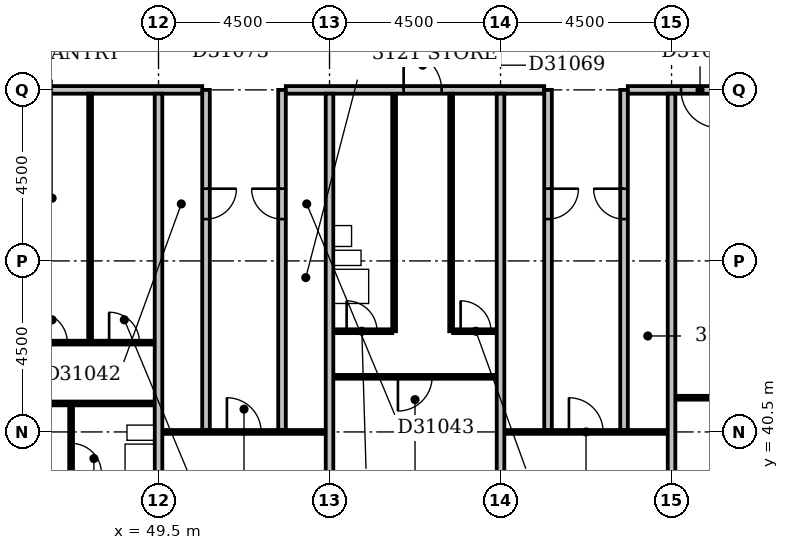
"""IFC4 building model, lengths in metres.
Left out: names, types, materials, properties, quantities, classifications, styles, units other than length and angle.
Written with IfcOpenShell. Run it as: python <this file> out.ifc"""

import sys

from ifc_helpers import new_model, si_unit, direction, frame, frame_2d, origin, place, context, subcontext, project, spatial, rectangle, extrude, element, fill, save


model = new_model("IFC4")
c1 = context("Model", 3, precision=1e-05, world=origin(), true_north=direction((0.0, 1.0)))
c2 = subcontext(c1, "Body", "Model", "MODEL_VIEW")
j1 = project(units=[si_unit("LENGTHUNIT", "METRE"), si_unit("PLANEANGLEUNIT", "RADIAN")], contexts=[c1])
p1 = place(None, origin())
s1 = spatial("IfcSite", under=j1, at=p1, CompositionType="ELEMENT")
p2 = place(p1, origin())
s2 = spatial("IfcBuilding", under=s1, at=p2, CompositionType="ELEMENT")
p3 = place(p2, frame((0.0, 0.0, 126.8)))
s3 = spatial("IfcBuildingStorey", under=s2, at=p3, CompositionType="ELEMENT", Elevation=126.8)
p4 = place(p3, frame((49.5, 36.5, 0.0), z_axis=(0.0, 0.0, 1.0), x_axis=(0.0, 1.0, 0.0)))
e1 = element("IfcWall", 1, at=p4, inside=s3, PredefinedType="PARTITIONING", context=c2, shape_type="SweptSolid", body=[
    extrude(rectangle(XDim=12.9, YDim=0.2, at=frame_2d((6.45, 0.0))), origin(), (0.0, 0.0, 1.0), 3.3),
])
p5 = place(p3, frame((54.0, 36.5, 0.0), z_axis=(0.0, 0.0, 1.0), x_axis=(0.0, 1.0, 0.0)))
e2 = element("IfcWall", 2, at=p5, inside=s3, PredefinedType="PARTITIONING", context=c2, shape_type="SweptSolid", body=[
    extrude(rectangle(XDim=12.9, YDim=0.2, at=frame_2d((6.45, 0.0))), origin(), (0.0, 0.0, 1.0), 2.6),
])
p6 = place(p3, frame((58.5, 36.5, 0.0), z_axis=(0.0, 0.0, 1.0), x_axis=(0.0, 1.0, 0.0)))
e3 = element("IfcWall", 3, at=p6, inside=s3, PredefinedType="PARTITIONING", context=c2, shape_type="SweptSolid", body=[
    extrude(rectangle(XDim=12.9, YDim=0.2, at=frame_2d((6.45, 0.0))), origin(), (0.0, 0.0, 1.0), 3.3),
])
p7 = place(p3, frame((63.0, 36.5, 0.0), z_axis=(0.0, 0.0, 1.0), x_axis=(0.0, 1.0, 0.0)))
e4 = element("IfcWall", 4, at=p7, inside=s3, PredefinedType="PARTITIONING", context=c2, shape_type="SweptSolid", body=[
    extrude(rectangle(XDim=12.9, YDim=0.2, at=frame_2d((6.45, 0.0))), origin(), (0.0, 0.0, 1.0), 2.4),
])
p8 = place(p3, frame((47.2, 38.35, 0.0), z_axis=(0.0, 0.0, 1.0), x_axis=(0.0, 1.0, 0.0)))
e5 = element("IfcWall", 5, at=p8, inside=s3, PredefinedType="PLUMBINGWALL", context=c2, shape_type="SweptSolid", body=[
    extrude(rectangle(XDim=2.85, YDim=0.1, at=frame_2d((1.425, 0.0))), origin(), (0.0, 0.0, 1.0), 3.3),
])
p9 = place(p8, frame((1.05, 0.0, 0.0)))
e6 = element("IfcOpeningElement", 6, at=p9, cuts=e5, PredefinedType="OPENING", context=c2, shape_type="SweptSolid", body=[
    extrude(rectangle(XDim=0.8, YDim=2.1, at=frame_2d((0.4, 1.05))), frame((0.0, 0.062, 0.0), z_axis=(0.0, -1.0, 0.0), x_axis=(1.0, 0.0, 0.0)), (0.0, 0.0, 1.0), 0.124),
])
p10 = place(p3, frame((49.6, 40.5, 0.0), z_axis=(0.0, 0.0, 1.0), x_axis=(1.0, 0.0, 0.0)))
e7 = element("IfcWall", 7, at=p10, inside=s3, PredefinedType="PARTITIONING", context=c2, shape_type="SweptSolid", body=[
    extrude(rectangle(XDim=4.3, YDim=0.1, at=frame_2d((2.15, 0.0))), origin(), (0.0, 0.0, 1.0), 3.3),
])
p11 = place(p10, frame((1.7, 0.0, 0.0)))
e8 = element("IfcOpeningElement", 8, at=p11, cuts=e7, PredefinedType="OPENING", context=c2, shape_type="SweptSolid", body=[
    extrude(rectangle(XDim=0.9, YDim=2.1, at=frame_2d((0.45, 1.05))), frame((0.0, 0.062, 0.0), z_axis=(0.0, -1.0, 0.0), x_axis=(1.0, 0.0, 0.0)), (0.0, 0.0, 1.0), 0.124),
])
p12 = place(p3, frame((58.6, 40.5, 0.0), z_axis=(0.0, 0.0, 1.0), x_axis=(1.0, 0.0, 0.0)))
e9 = element("IfcWall", 9, at=p12, inside=s3, PredefinedType="PARTITIONING", context=c2, shape_type="SweptSolid", body=[
    extrude(rectangle(XDim=4.3, YDim=0.1, at=frame_2d((2.15, 0.0))), origin(), (0.0, 0.0, 1.0), 3.3),
])
p13 = place(p12, frame((1.7, 0.0, 0.0)))
e10 = element("IfcOpeningElement", 10, at=p13, cuts=e9, PredefinedType="OPENING", context=c2, shape_type="SweptSolid", body=[
    extrude(rectangle(XDim=0.9, YDim=2.1, at=frame_2d((0.45, 1.05))), frame((0.0, 0.062, 0.0), z_axis=(0.0, -1.0, 0.0), x_axis=(1.0, 0.0, 0.0)), (0.0, 0.0, 1.0), 0.124),
])
p14 = place(p3, frame((50.75, 40.55, 0.0), z_axis=(0.0, 0.0, 1.0), x_axis=(0.0, 1.0, 0.0)))
e11 = element("IfcWall", 11, at=p14, inside=s3, PredefinedType="PARTITIONING", context=c2, shape_type="SweptSolid", body=[
    extrude(rectangle(XDim=8.95, YDim=0.2, at=frame_2d((4.475, 0.0))), origin(), (0.0, 0.0, 1.0), 3.3),
])
p15 = place(p14, frame((5.55, 0.0, 0.0)))
e12 = element("IfcOpeningElement", 12, at=p15, cuts=e11, PredefinedType="OPENING", context=c2, shape_type="SweptSolid", body=[
    extrude(rectangle(XDim=0.8, YDim=2.1, at=frame_2d((0.4, 1.05))), frame((0.0, 0.112, 0.0), z_axis=(0.0, -1.0, 0.0), x_axis=(1.0, 0.0, 0.0)), (0.0, 0.0, 1.0), 0.224),
])
p16 = place(p3, frame((52.75, 40.55, 0.0), z_axis=(0.0, 0.0, 1.0), x_axis=(0.0, 1.0, 0.0)))
e13 = element("IfcWall", 13, at=p16, inside=s3, PredefinedType="PARTITIONING", context=c2, shape_type="SweptSolid", body=[
    extrude(rectangle(XDim=8.95, YDim=0.2, at=frame_2d((4.475, 0.0))), origin(), (0.0, 0.0, 1.0), 3.3),
])
p17 = place(p16, frame((5.55, 0.0, 0.0)))
e14 = element("IfcOpeningElement", 14, at=p17, cuts=e13, PredefinedType="OPENING", context=c2, shape_type="SweptSolid", body=[
    extrude(rectangle(XDim=0.8, YDim=2.1, at=frame_2d((0.4, 1.05))), frame((0.0, 0.112, 0.0), z_axis=(0.0, -1.0, 0.0), x_axis=(1.0, 0.0, 0.0)), (0.0, 0.0, 1.0), 0.224),
])
p18 = place(p3, frame((59.75, 40.55, 0.0), z_axis=(0.0, 0.0, 1.0), x_axis=(0.0, 1.0, 0.0)))
e15 = element("IfcWall", 15, at=p18, inside=s3, PredefinedType="PARTITIONING", context=c2, shape_type="SweptSolid", body=[
    extrude(rectangle(XDim=8.95, YDim=0.2, at=frame_2d((4.475, 0.0))), origin(), (0.0, 0.0, 1.0), 3.3),
])
p19 = place(p18, frame((5.55, 0.0, 0.0)))
e16 = element("IfcOpeningElement", 16, at=p19, cuts=e15, PredefinedType="OPENING", context=c2, shape_type="SweptSolid", body=[
    extrude(rectangle(XDim=0.8, YDim=2.1, at=frame_2d((0.4, 1.05))), frame((0.0, 0.112, 0.0), z_axis=(0.0, -1.0, 0.0), x_axis=(1.0, 0.0, 0.0)), (0.0, 0.0, 1.0), 0.224),
])
p20 = place(p3, frame((61.75, 40.55, 0.0), z_axis=(0.0, 0.0, 1.0), x_axis=(0.0, 1.0, 0.0)))
e17 = element("IfcWall", 17, at=p20, inside=s3, PredefinedType="PARTITIONING", context=c2, shape_type="SweptSolid", body=[
    extrude(rectangle(XDim=8.95, YDim=0.2, at=frame_2d((4.475, 0.0))), origin(), (0.0, 0.0, 1.0), 3.3),
])
p21 = place(p20, frame((5.55, 0.0, 0.0)))
e18 = element("IfcOpeningElement", 18, at=p21, cuts=e17, PredefinedType="OPENING", context=c2, shape_type="SweptSolid", body=[
    extrude(rectangle(XDim=0.8, YDim=2.1, at=frame_2d((0.4, 1.05))), frame((0.0, 0.112, 0.0), z_axis=(0.0, -1.0, 0.0), x_axis=(1.0, 0.0, 0.0)), (0.0, 0.0, 1.0), 0.224),
])
p22 = place(p3, frame((31.6, 41.25, 0.0), z_axis=(0.0, 0.0, 1.0), x_axis=(1.0, 0.0, 0.0)))
e19 = element("IfcWall", 19, at=p22, inside=s3, PredefinedType="PARTITIONING", context=c2, shape_type="SweptSolid", body=[
    extrude(rectangle(XDim=17.8, YDim=0.1, at=frame_2d((8.9, 0.0))), origin(), (0.0, 0.0, 1.0), 3.3),
])
p23 = place(p22, frame((2.85, 0.0, 0.0)))
e20 = element("IfcOpeningElement", 20, at=p23, cuts=e19, PredefinedType="OPENING", context=c2, shape_type="SweptSolid", body=[
    extrude(rectangle(XDim=0.9, YDim=2.1, at=frame_2d((0.45, 1.05))), frame((0.0, 0.062, 0.0), z_axis=(0.0, -1.0, 0.0), x_axis=(1.0, 0.0, 0.0)), (0.0, 0.0, 1.0), 0.124),
])
p24 = place(p22, frame((8.4, 0.0, 0.0)))
e21 = element("IfcOpeningElement", 21, at=p24, cuts=e19, PredefinedType="OPENING", context=c2, shape_type="SweptSolid", body=[
    extrude(rectangle(XDim=0.9, YDim=2.1, at=frame_2d((0.45, 1.05))), frame((0.0, 0.062, 0.0), z_axis=(0.0, -1.0, 0.0), x_axis=(1.0, 0.0, 0.0)), (0.0, 0.0, 1.0), 0.124),
])
p25 = place(p22, frame((14.05, 0.0, 0.0)))
e22 = element("IfcOpeningElement", 22, at=p25, cuts=e19, PredefinedType="OPENING", context=c2, shape_type="SweptSolid", body=[
    extrude(rectangle(XDim=0.9, YDim=2.1, at=frame_2d((0.45, 1.05))), frame((0.0, 0.062, 0.0), z_axis=(0.0, -1.0, 0.0), x_axis=(1.0, 0.0, 0.0)), (0.0, 0.0, 1.0), 0.124),
])
p26 = place(p3, frame((63.1, 41.4, 0.0), z_axis=(0.0, 0.0, 1.0), x_axis=(1.0, 0.0, 0.0)))
e23 = element("IfcWall", 23, at=p26, inside=s3, PredefinedType="PARTITIONING", context=c2, shape_type="SweptSolid", body=[
    extrude(rectangle(XDim=5.0, YDim=0.1, at=frame_2d((2.5, 0.0))), origin(), (0.0, 0.0, 1.0), 3.3),
])
p27 = place(p26, frame((1.7, 0.0, 0.0)))
e24 = element("IfcOpeningElement", 24, at=p27, cuts=e23, PredefinedType="OPENING", context=c2, shape_type="SweptSolid", body=[
    extrude(rectangle(XDim=0.9, YDim=2.1, at=frame_2d((0.45, 1.05))), frame((0.0, 0.062, 0.0), z_axis=(0.0, -1.0, 0.0), x_axis=(1.0, 0.0, 0.0)), (0.0, 0.0, 1.0), 0.124),
])
p28 = place(p3, frame((54.1, 41.95, 0.0), z_axis=(0.0, 0.0, 1.0), x_axis=(1.0, 0.0, 0.0)))
e25 = element("IfcWall", 25, at=p28, inside=s3, PredefinedType="PARTITIONING", context=c2, shape_type="SweptSolid", body=[
    extrude(rectangle(XDim=4.3, YDim=0.1, at=frame_2d((2.15, 0.0))), origin(), (0.0, 0.0, 1.0), 3.3),
])
p29 = place(p28, frame((1.7, 0.0, 0.0)))
e26 = element("IfcOpeningElement", 26, at=p29, cuts=e25, PredefinedType="OPENING", context=c2, shape_type="SweptSolid", body=[
    extrude(rectangle(XDim=0.9, YDim=2.1, at=frame_2d((0.45, 1.05))), frame((0.0, 0.062, 0.0), z_axis=(0.0, -1.0, 0.0), x_axis=(1.0, 0.0, 0.0)), (0.0, 0.0, 1.0), 0.124),
])
p30 = place(p3, frame((38.25, 42.85, 0.0), z_axis=(0.0, 0.0, 1.0), x_axis=(1.0, 0.0, 0.0)))
e27 = element("IfcWall", 27, at=p30, inside=s3, PredefinedType="PARTITIONING", context=c2, shape_type="SweptSolid", body=[
    extrude(rectangle(XDim=11.15, YDim=0.1, at=frame_2d((5.575, 0.0))), origin(), (0.0, 0.0, 1.0), 3.3),
])
p31 = place(p30, frame((0.75, 0.0, 0.0)))
e28 = element("IfcOpeningElement", 28, at=p31, cuts=e27, PredefinedType="OPENING", context=c2, shape_type="SweptSolid", body=[
    extrude(rectangle(XDim=0.8, YDim=2.1, at=frame_2d((0.4, 1.05))), frame((0.0, 0.062, 0.0), z_axis=(0.0, -1.0, 0.0), x_axis=(1.0, 0.0, 0.0)), (0.0, 0.0, 1.0), 0.124),
])
p32 = place(p30, frame((8.05, 0.0, 0.0)))
e29 = element("IfcOpeningElement", 29, at=p32, cuts=e27, PredefinedType="OPENING", context=c2, shape_type="SweptSolid", body=[
    extrude(rectangle(XDim=0.8, YDim=2.1, at=frame_2d((0.4, 1.05))), frame((0.0, 0.062, 0.0), z_axis=(0.0, -1.0, 0.0), x_axis=(1.0, 0.0, 0.0)), (0.0, 0.0, 1.0), 0.124),
])
p33 = place(p30, frame((4.25, 0.0, 0.0)))
e30 = element("IfcOpeningElement", 30, at=p33, cuts=e27, PredefinedType="OPENING", context=c2, shape_type="SweptSolid", body=[
    extrude(rectangle(XDim=0.8, YDim=2.1, at=frame_2d((0.4, 1.05))), frame((0.0, 0.062, 0.0), z_axis=(0.0, -1.0, 0.0), x_axis=(1.0, 0.0, 0.0)), (0.0, 0.0, 1.0), 0.124),
])
p34 = place(p30, frame((6.05, 0.0, 0.0)))
e31 = element("IfcOpeningElement", 31, at=p34, cuts=e27, PredefinedType="OPENING", context=c2, shape_type="SweptSolid", body=[
    extrude(rectangle(XDim=0.8, YDim=2.1, at=frame_2d((0.4, 1.05))), frame((0.0, 0.062, 0.0), z_axis=(0.0, -1.0, 0.0), x_axis=(1.0, 0.0, 0.0)), (0.0, 0.0, 1.0), 0.124),
])
p35 = place(p30, frame((9.95, 0.0, 0.0)))
e32 = element("IfcOpeningElement", 32, at=p35, cuts=e27, PredefinedType="OPENING", context=c2, shape_type="SweptSolid", body=[
    extrude(rectangle(XDim=0.8, YDim=2.1, at=frame_2d((0.4, 1.05))), frame((0.0, 0.062, 0.0), z_axis=(0.0, -1.0, 0.0), x_axis=(1.0, 0.0, 0.0)), (0.0, 0.0, 1.0), 0.124),
])
p36 = place(p30, frame((2.7, 0.0, 0.0)))
e33 = element("IfcOpeningElement", 33, at=p36, cuts=e27, PredefinedType="OPENING", context=c2, shape_type="SweptSolid", body=[
    extrude(rectangle(XDim=0.8, YDim=2.1, at=frame_2d((0.4, 1.05))), frame((0.0, 0.062, 0.0), z_axis=(0.0, -1.0, 0.0), x_axis=(1.0, 0.0, 0.0)), (0.0, 0.0, 1.0), 0.124),
])
p37 = place(p3, frame((47.7, 42.9, 0.0), z_axis=(0.0, 0.0, 1.0), x_axis=(0.0, 1.0, 0.0)))
e34 = element("IfcWall", 34, at=p37, inside=s3, PredefinedType="PARTITIONING", context=c2, shape_type="SweptSolid", body=[
    extrude(rectangle(XDim=6.5, YDim=0.1, at=frame_2d((3.25, 0.0))), origin(), (0.0, 0.0, 1.0), 3.3),
])
p38 = place(p3, frame((54.1, 43.15, 0.0), z_axis=(0.0, 0.0, 1.0), x_axis=(1.0, 0.0, 0.0)))
e35 = element("IfcWall", 35, at=p38, inside=s3, PredefinedType="PARTITIONING", context=c2, shape_type="SweptSolid", body=[
    extrude(rectangle(XDim=1.55, YDim=0.1, at=frame_2d((0.775, 0.0))), origin(), (0.0, 0.0, 1.0), 3.3),
])
p39 = place(p38, frame((0.35, 0.0, 0.0)))
e36 = element("IfcOpeningElement", 36, at=p39, cuts=e35, PredefinedType="OPENING", context=c2, shape_type="SweptSolid", body=[
    extrude(rectangle(XDim=0.8, YDim=2.1, at=frame_2d((0.4, 1.05))), frame((0.0, 0.062, 0.0), z_axis=(0.0, -1.0, 0.0), x_axis=(1.0, 0.0, 0.0)), (0.0, 0.0, 1.0), 0.124),
])
p40 = place(p3, frame((55.7, 43.15, 0.0), z_axis=(0.0, 0.0, 1.0), x_axis=(0.0, 1.0, 0.0)))
e37 = element("IfcWall", 37, at=p40, inside=s3, PredefinedType="PLUMBINGWALL", context=c2, shape_type="SweptSolid", body=[
    extrude(rectangle(XDim=6.25, YDim=0.1, at=frame_2d((3.125, 0.0))), origin(), (0.0, 0.0, 1.0), 3.3),
])
p41 = place(p3, frame((57.2, 43.15, 0.0), z_axis=(0.0, 0.0, 1.0), x_axis=(0.0, 1.0, 0.0)))
e38 = element("IfcWall", 38, at=p41, inside=s3, PredefinedType="PARTITIONING", context=c2, shape_type="SweptSolid", body=[
    extrude(rectangle(XDim=6.25, YDim=0.1, at=frame_2d((3.125, 0.0))), origin(), (0.0, 0.0, 1.0), 3.3),
])
p42 = place(p3, frame((57.25, 43.15, 0.0), z_axis=(0.0, 0.0, 1.0), x_axis=(1.0, 0.0, 0.0)))
e39 = element("IfcWall", 39, at=p42, inside=s3, PredefinedType="PARTITIONING", context=c2, shape_type="SweptSolid", body=[
    extrude(rectangle(XDim=1.15, YDim=0.1, at=frame_2d((0.575, 0.0))), origin(), (0.0, 0.0, 1.0), 3.3),
])
p43 = place(p42, frame((0.2, 0.0, 0.0)))
e40 = element("IfcOpeningElement", 40, at=p43, cuts=e39, PredefinedType="OPENING", context=c2, shape_type="SweptSolid", body=[
    extrude(rectangle(XDim=0.8, YDim=2.1, at=frame_2d((0.4, 1.05))), frame((0.0, 0.062, 0.0), z_axis=(0.0, -1.0, 0.0), x_axis=(1.0, 0.0, 0.0)), (0.0, 0.0, 1.0), 0.124),
])
p44 = place(p3, frame((9.1, 49.5, 0.0), z_axis=(0.0, 0.0, 1.0), x_axis=(1.0, 0.0, 0.0)))
e41 = element("IfcWall", 41, at=p44, inside=s3, PredefinedType="PARTITIONING", context=c2, shape_type="SweptSolid", body=[
    extrude(rectangle(XDim=41.55, YDim=0.2, at=frame_2d((20.775, 0.0))), origin(), (0.0, 0.0, 1.0), 3.3),
])
p45 = place(p44, frame((13.7, 0.0, 0.0)))
e42 = element("IfcOpeningElement", 42, at=p45, cuts=e41, PredefinedType="OPENING", context=c2, shape_type="SweptSolid", body=[
    extrude(rectangle(XDim=1.0, YDim=2.1, at=frame_2d((0.5, 1.05))), frame((0.0, 0.112, 0.0), z_axis=(0.0, -1.0, 0.0), x_axis=(1.0, 0.0, 0.0)), (0.0, 0.0, 1.0), 0.224),
])
p46 = place(p44, frame((27.8, 0.0, 0.0)))
e43 = element("IfcOpeningElement", 43, at=p46, cuts=e41, PredefinedType="OPENING", context=c2, shape_type="SweptSolid", body=[
    extrude(rectangle(XDim=1.0, YDim=2.1, at=frame_2d((0.5, 1.05))), frame((0.0, 0.112, 0.0), z_axis=(0.0, -1.0, 0.0), x_axis=(1.0, 0.0, 0.0)), (0.0, 0.0, 1.0), 0.224),
])
p47 = place(p44, frame((8.4, 0.0, 0.0)))
e44 = element("IfcOpeningElement", 44, at=p47, cuts=e41, PredefinedType="OPENING", context=c2, shape_type="SweptSolid", body=[
    extrude(rectangle(XDim=0.9, YDim=2.1, at=frame_2d((0.45, 1.05))), frame((0.0, 0.112, 0.0), z_axis=(0.0, -1.0, 0.0), x_axis=(1.0, 0.0, 0.0)), (0.0, 0.0, 1.0), 0.224),
])
p48 = place(p3, frame((52.85, 49.5, 0.0), z_axis=(0.0, 0.0, 1.0), x_axis=(1.0, 0.0, 0.0)))
e45 = element("IfcWall", 45, at=p48, inside=s3, PredefinedType="PARTITIONING", context=c2, shape_type="SweptSolid", body=[
    extrude(rectangle(XDim=6.8, YDim=0.2, at=frame_2d((3.4, 0.0))), origin(), (0.0, 0.0, 1.0), 3.3),
])
p49 = place(p48, frame((3.1, 0.0, 0.0)))
e46 = element("IfcOpeningElement", 46, at=p49, cuts=e45, PredefinedType="OPENING", context=c2, shape_type="SweptSolid", body=[
    extrude(rectangle(XDim=1.0, YDim=2.1, at=frame_2d((0.5, 1.05))), frame((0.0, 0.112, 0.0), z_axis=(0.0, -1.0, 0.0), x_axis=(1.0, 0.0, 0.0)), (0.0, 0.0, 1.0), 0.224),
])
p50 = place(p3, frame((61.85, 49.5, 0.0), z_axis=(0.0, 0.0, 1.0), x_axis=(1.0, 0.0, 0.0)))
e47 = element("IfcWall", 47, at=p50, inside=s3, PredefinedType="PARTITIONING", context=c2, shape_type="SweptSolid", body=[
    extrude(rectangle(XDim=5.15, YDim=0.2, at=frame_2d((2.575, 0.0))), origin(), (0.0, 0.0, 1.0), 3.3),
])
p51 = place(p50, frame((1.4, 0.0, 0.0)))
e48 = element("IfcOpeningElement", 48, at=p51, cuts=e47, PredefinedType="OPENING", context=c2, shape_type="SweptSolid", body=[
    extrude(rectangle(XDim=1.0, YDim=2.1, at=frame_2d((0.5, 1.05))), frame((0.0, 0.112, 0.0), z_axis=(0.0, -1.0, 0.0), x_axis=(1.0, 0.0, 0.0)), (0.0, 0.0, 1.0), 0.224),
])
p52 = place(p9, frame((0.8, 0.0, 0.0), z_axis=(0.0, 0.0, 1.0), x_axis=(-1.0, 0.0, 0.0)))
e49 = element("IfcDoor", 49, at=p52, inside=s3, OperationType="SINGLE_SWING_RIGHT", PredefinedType="DOOR", context=c2, shape_type="SweptSolid", body=[
    extrude(rectangle(XDim=0.8, YDim=2.1, at=frame_2d((0.4, 1.05))), frame((0.0, 0.025, 0.0), z_axis=(0.0, -1.0, 0.0), x_axis=(1.0, 0.0, 0.0)), (0.0, 0.0, 1.0), 0.05),
])
fill(e6, e49)
p53 = place(p11, origin())
e50 = element("IfcDoor", 50, at=p53, inside=s3, OperationType="SINGLE_SWING_LEFT", PredefinedType="DOOR", context=c2, shape_type="SweptSolid", body=[
    extrude(rectangle(XDim=0.9, YDim=2.1, at=frame_2d((0.45, 1.05))), frame((0.0, 0.025, 0.0), z_axis=(0.0, -1.0, 0.0), x_axis=(1.0, 0.0, 0.0)), (0.0, 0.0, 1.0), 0.05),
])
fill(e8, e50)
p54 = place(p13, origin())
e51 = element("IfcDoor", 51, at=p54, inside=s3, OperationType="SINGLE_SWING_LEFT", PredefinedType="DOOR", context=c2, shape_type="SweptSolid", body=[
    extrude(rectangle(XDim=0.9, YDim=2.1, at=frame_2d((0.45, 1.05))), frame((0.0, 0.025, 0.0), z_axis=(0.0, -1.0, 0.0), x_axis=(1.0, 0.0, 0.0)), (0.0, 0.0, 1.0), 0.05),
])
fill(e10, e51)
p55 = place(p15, origin())
e52 = element("IfcDoor", 52, at=p55, inside=s3, OperationType="SINGLE_SWING_RIGHT", PredefinedType="DOOR", context=c2, shape_type="SweptSolid", body=[
    extrude(rectangle(XDim=0.8, YDim=2.1, at=frame_2d((0.4, 1.05))), frame((0.0, 0.025, 0.0), z_axis=(0.0, -1.0, 0.0), x_axis=(1.0, 0.0, 0.0)), (0.0, 0.0, 1.0), 0.05),
])
fill(e12, e52)
p56 = place(p17, frame((0.8, 0.0, 0.0), z_axis=(0.0, 0.0, 1.0), x_axis=(-1.0, 0.0, 0.0)))
e53 = element("IfcDoor", 53, at=p56, inside=s3, OperationType="SINGLE_SWING_LEFT", PredefinedType="DOOR", context=c2, shape_type="SweptSolid", body=[
    extrude(rectangle(XDim=0.8, YDim=2.1, at=frame_2d((0.4, 1.05))), frame((0.0, 0.025, 0.0), z_axis=(0.0, -1.0, 0.0), x_axis=(1.0, 0.0, 0.0)), (0.0, 0.0, 1.0), 0.05),
])
fill(e14, e53)
p57 = place(p19, origin())
e54 = element("IfcDoor", 54, at=p57, inside=s3, OperationType="SINGLE_SWING_RIGHT", PredefinedType="DOOR", context=c2, shape_type="SweptSolid", body=[
    extrude(rectangle(XDim=0.8, YDim=2.1, at=frame_2d((0.4, 1.05))), frame((0.0, 0.025, 0.0), z_axis=(0.0, -1.0, 0.0), x_axis=(1.0, 0.0, 0.0)), (0.0, 0.0, 1.0), 0.05),
])
fill(e16, e54)
p58 = place(p21, frame((0.8, 0.0, 0.0), z_axis=(0.0, 0.0, 1.0), x_axis=(-1.0, 0.0, 0.0)))
e55 = element("IfcDoor", 55, at=p58, inside=s3, OperationType="SINGLE_SWING_LEFT", PredefinedType="DOOR", context=c2, shape_type="SweptSolid", body=[
    extrude(rectangle(XDim=0.8, YDim=2.1, at=frame_2d((0.4, 1.05))), frame((0.0, 0.025, 0.0), z_axis=(0.0, -1.0, 0.0), x_axis=(1.0, 0.0, 0.0)), (0.0, 0.0, 1.0), 0.05),
])
fill(e18, e55)
p59 = place(p29, frame((0.9, 0.0, 0.0), z_axis=(0.0, 0.0, 1.0), x_axis=(-1.0, 0.0, 0.0)))
e56 = element("IfcDoor", 56, at=p59, inside=s3, OperationType="SINGLE_SWING_RIGHT", PredefinedType="DOOR", context=c2, shape_type="SweptSolid", body=[
    extrude(rectangle(XDim=0.9, YDim=2.1, at=frame_2d((0.45, 1.05))), frame((0.0, 0.025, 0.0), z_axis=(0.0, -1.0, 0.0), x_axis=(1.0, 0.0, 0.0)), (0.0, 0.0, 1.0), 0.05),
])
fill(e26, e56)
p60 = place(p32, origin())
e57 = element("IfcDoor", 57, at=p60, inside=s3, OperationType="SINGLE_SWING_LEFT", PredefinedType="DOOR", context=c2, shape_type="SweptSolid", body=[
    extrude(rectangle(XDim=0.8, YDim=2.1, at=frame_2d((0.4, 1.05))), frame((0.0, 0.025, 0.0), z_axis=(0.0, -1.0, 0.0), x_axis=(1.0, 0.0, 0.0)), (0.0, 0.0, 1.0), 0.05),
])
fill(e29, e57)
p61 = place(p35, origin())
e58 = element("IfcDoor", 58, at=p61, inside=s3, OperationType="SINGLE_SWING_LEFT", PredefinedType="DOOR", context=c2, shape_type="SweptSolid", body=[
    extrude(rectangle(XDim=0.8, YDim=2.1, at=frame_2d((0.4, 1.05))), frame((0.0, 0.025, 0.0), z_axis=(0.0, -1.0, 0.0), x_axis=(1.0, 0.0, 0.0)), (0.0, 0.0, 1.0), 0.05),
])
fill(e32, e58)
p62 = place(p39, origin())
e59 = element("IfcDoor", 59, at=p62, inside=s3, OperationType="SINGLE_SWING_LEFT", PredefinedType="DOOR", context=c2, shape_type="SweptSolid", body=[
    extrude(rectangle(XDim=0.8, YDim=2.1, at=frame_2d((0.4, 1.05))), frame((0.0, 0.025, 0.0), z_axis=(0.0, -1.0, 0.0), x_axis=(1.0, 0.0, 0.0)), (0.0, 0.0, 1.0), 0.05),
])
fill(e36, e59)
p63 = place(p43, origin())
e60 = element("IfcDoor", 60, at=p63, inside=s3, OperationType="SINGLE_SWING_LEFT", PredefinedType="DOOR", context=c2, shape_type="SweptSolid", body=[
    extrude(rectangle(XDim=0.8, YDim=2.1, at=frame_2d((0.4, 1.05))), frame((0.0, 0.025, 0.0), z_axis=(0.0, -1.0, 0.0), x_axis=(1.0, 0.0, 0.0)), (0.0, 0.0, 1.0), 0.05),
])
fill(e40, e60)
p64 = place(p49, origin())
e61 = element("IfcDoor", 61, at=p64, inside=s3, OperationType="SINGLE_SWING_LEFT", PredefinedType="DOOR", context=c2, shape_type="SweptSolid", body=[
    extrude(rectangle(XDim=1.0, YDim=2.1, at=frame_2d((0.5, 1.05))), frame((0.0, 0.025, 0.0), z_axis=(0.0, -1.0, 0.0), x_axis=(1.0, 0.0, 0.0)), (0.0, 0.0, 1.0), 0.05),
])
fill(e46, e61)
p65 = place(p51, origin())
e62 = element("IfcDoor", 62, at=p65, inside=s3, OperationType="SINGLE_SWING_RIGHT", PredefinedType="DOOR", context=c2, shape_type="SweptSolid", body=[
    extrude(rectangle(XDim=1.0, YDim=2.1, at=frame_2d((0.5, 1.05))), frame((0.0, 0.025, 0.0), z_axis=(0.0, -1.0, 0.0), x_axis=(1.0, 0.0, 0.0)), (0.0, 0.0, 1.0), 0.05),
])
fill(e48, e62)
save(model, sys.argv[1])
